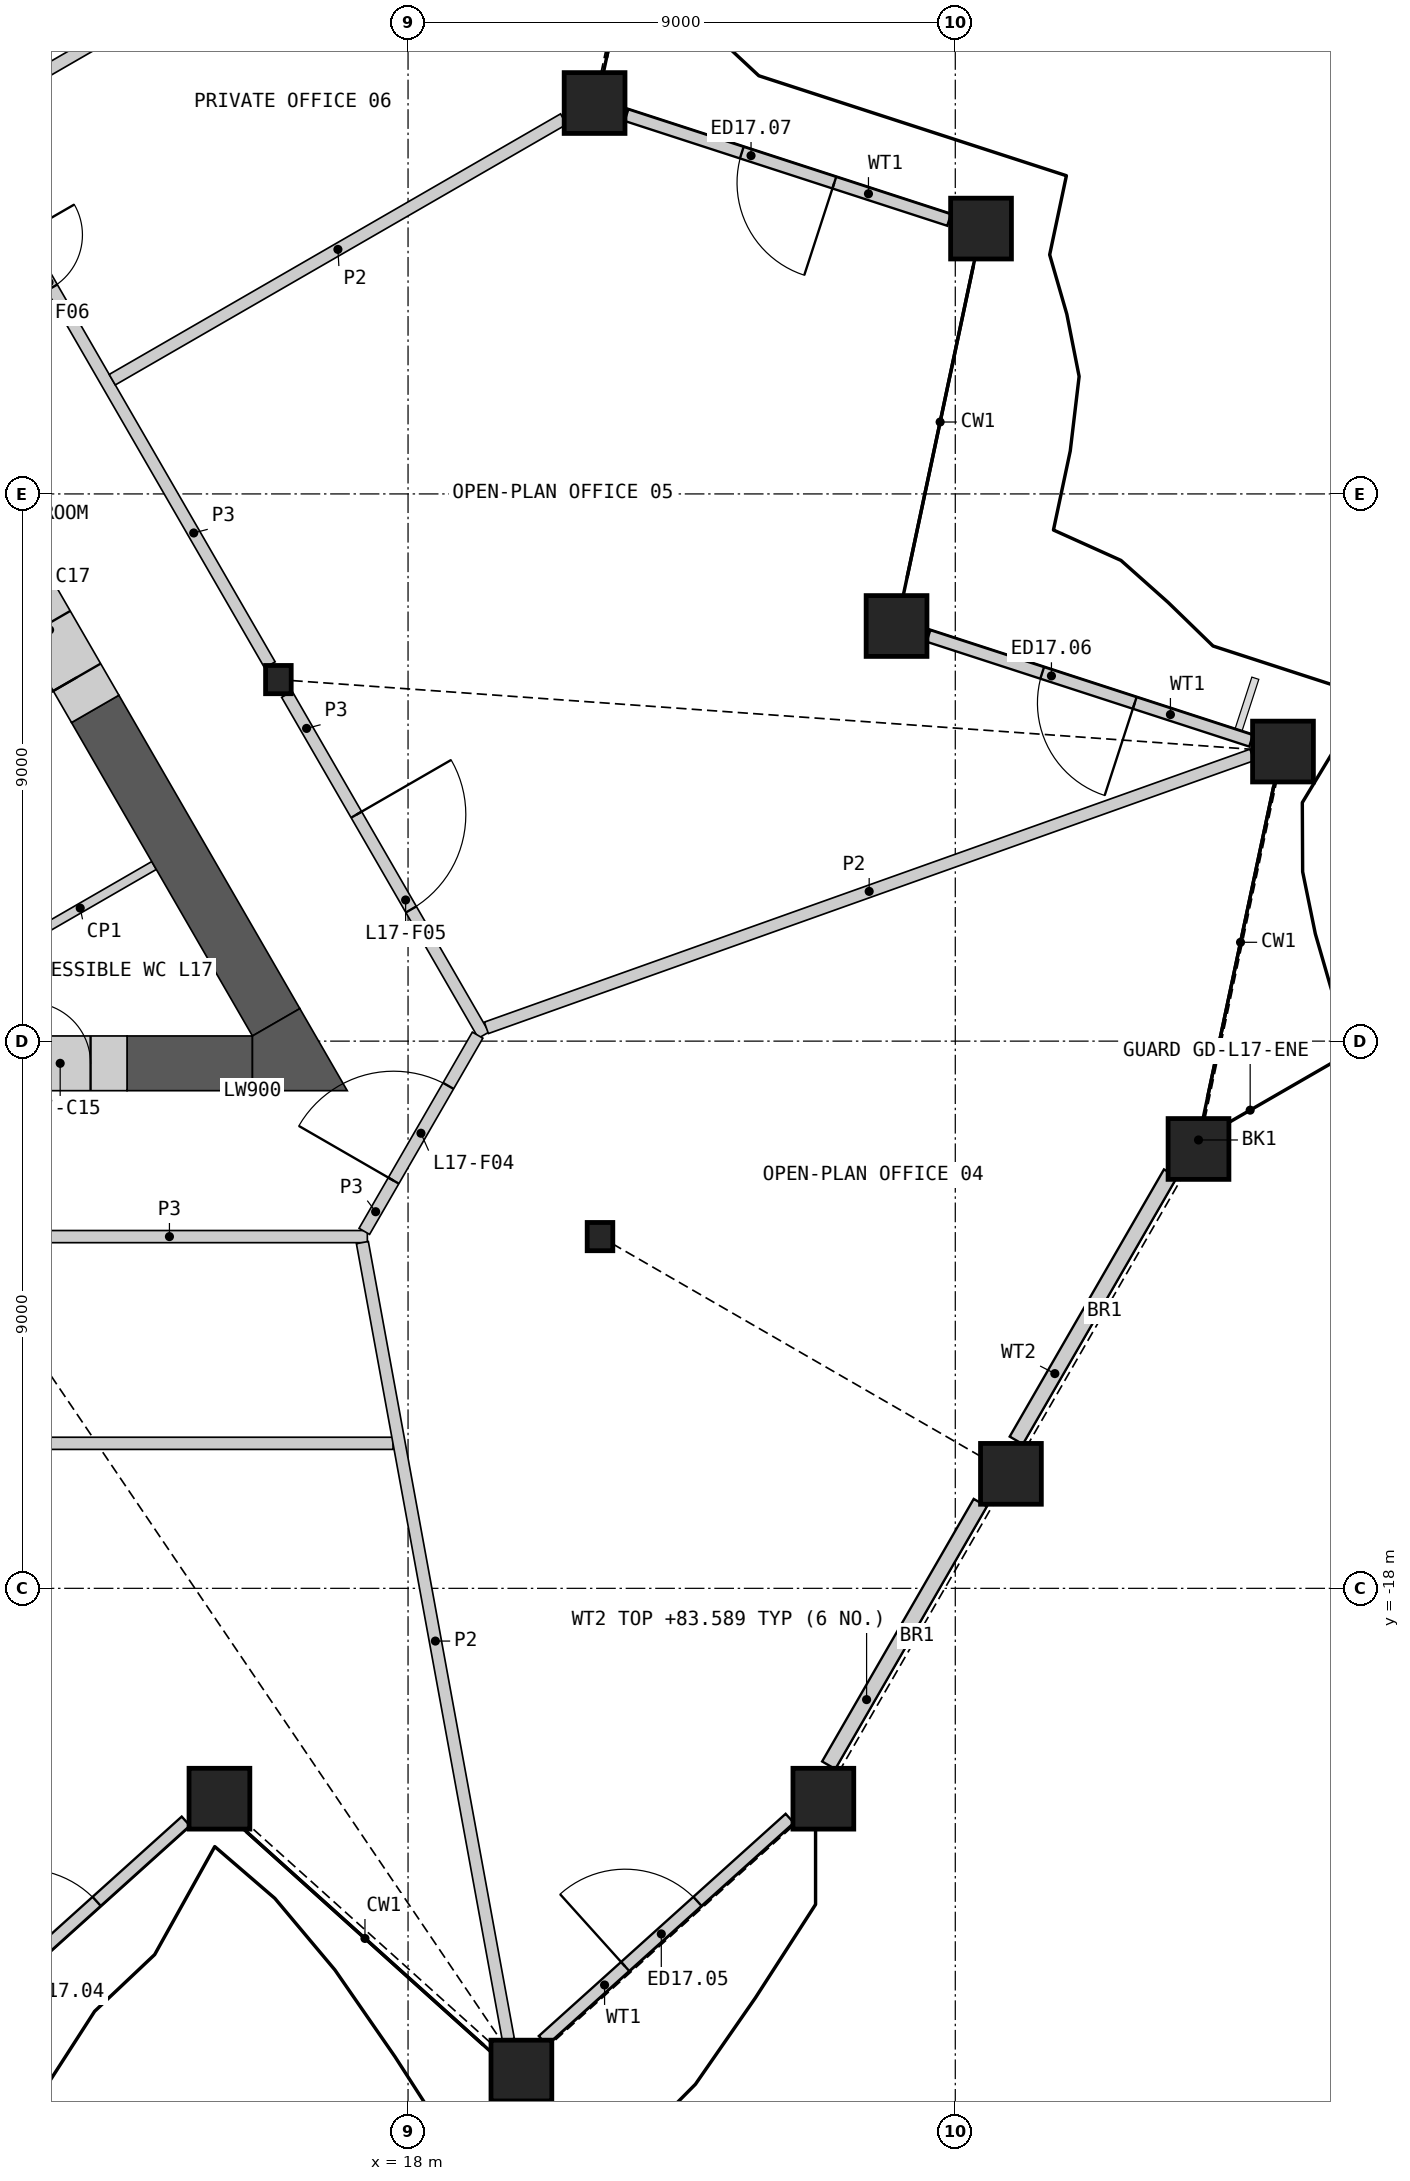
"""IFC4 building model, lengths in metres.
Left out: names, types, materials, properties, quantities, classifications, styles, units other than length and angle.
Written with IfcOpenShell. Run it as: python <this file> out.ifc"""

import sys

from ifc_helpers import new_model, si_unit, direction, frame, frame_2d, origin, origin_2d, place, context, subcontext, project, spatial, polyline, rectangle, hollow_rectangle, i_section, outline, extrude, element, fill, save


model = new_model("IFC4")
c1 = context("Model", 3, precision=1e-05, world=origin(), true_north=direction((0.0, 1.0)))
c2 = subcontext(c1, "Body", "Model", "MODEL_VIEW")
j1 = project(units=[si_unit("LENGTHUNIT", "METRE"), si_unit("PLANEANGLEUNIT", "RADIAN")], contexts=[c1])
p1 = place(None, origin())
s1 = spatial("IfcSite", under=j1, at=p1, CompositionType="ELEMENT")
p2 = place(p1, origin())
s2 = spatial("IfcBuilding", under=s1, at=p2, CompositionType="ELEMENT")
p3 = place(p2, frame((0.0, 0.0, 80.4)))
s3 = spatial("IfcBuildingStorey", under=s2, at=p3, CompositionType="ELEMENT", Elevation=80.4)
for number, where, z_axis, x_axis in (
    (1, (14.898, -21.46, 0.0), (0.0, 0.0, 1.0), (1.0, 0.0, 0.0)),
    (2, (19.864, -25.931, 0.0), (0.0, 0.0, 1.0), (1.0, 0.0, 0.0)),
    (3, (24.83, -21.46, 0.0), (0.0, 0.0, 1.0), (1.0, 0.0, 0.0)),
    (4, (27.915, -16.117, 0.0), (0.0, 0.0, 1.0), (1.0, 0.0, 0.0)),
    (5, (31.0, -10.774, 0.0), (0.0, 0.0, 1.0), (1.0, 0.0, 0.0)),
    (6, (32.389, -4.237, 0.0), (0.0, 0.0, 1.0), (1.0, 0.0, 0.0)),
    (7, (26.034, -2.172, 0.0), (0.0, 0.0, 1.0), (1.0, 0.0, 0.0)),
    (8, (27.423, 4.364, 0.0), (0.0, 0.0, 1.0), (1.0, 0.0, 0.0)),
    (9, (21.068, 6.429, 0.0), (0.0, 0.0, 1.0), (1.0, 0.0, 0.0)),
):
    element("IfcColumn", number, at=place(p3, frame(where, z_axis=z_axis, x_axis=x_axis)), inside=s3, PredefinedType="COLUMN", context=c2, shape_type="SweptSolid", body=[
        extrude(hollow_rectangle(XDim=1.0, YDim=1.0, WallThickness=0.07, at=origin_2d()), origin(), (0.0, 0.0, 1.0), 4.2),
    ])
for number, where, z_axis, x_axis in (
    (10, (21.157, -12.215, 0.0), (0.0, 0.0, 1.0), (1.0, 0.0, 0.0)),
    (11, (15.868, -3.054, 0.0), (0.0, 0.0, 1.0), (1.0, 0.0, 0.0)),
):
    element("IfcColumn", number, at=place(p3, frame(where, z_axis=z_axis, x_axis=x_axis)), inside=s3, PredefinedType="COLUMN", context=c2, shape_type="SweptSolid", body=[
        extrude(i_section(OverallWidth=0.421, OverallDepth=0.465, WebThickness=0.045, FlangeThickness=0.072, at=origin_2d()), origin(), (0.0, 0.0, 1.0), 4.2),
    ])
p4 = place(p3, frame((10.336, -25.438, 0.0), z_axis=(0.0, 0.0, 1.0), x_axis=(0.74316358834, 0.669109767501, 0.0)))
e12 = element("IfcWall", 12, at=p4, inside=s3, PredefinedType="SOLIDWALL", context=c2, shape_type="SweptSolid", body=[
    extrude(rectangle(XDim=5.394, YDim=0.2, at=frame_2d((2.697, 0.0))), origin(), (0.0, 0.0, 1.0), 3.189),
])
p5 = place(p4, frame((1.821, 0.0, 0.0)))
e13 = element("IfcOpeningElement", 13, at=p5, cuts=e12, PredefinedType="OPENING", context=c2, shape_type="SweptSolid", body=[
    extrude(rectangle(XDim=1.6, YDim=2.4, at=frame_2d((0.8, 1.2))), frame((0.0, 0.11, 0.0), z_axis=(0.0, -1.0, 0.0), x_axis=(1.0, 0.0, 0.0)), (0.0, 0.0, 1.0), 0.22),
])
p6 = place(p3, frame((20.217, -25.438, 0.0), z_axis=(0.0, 0.0, 1.0), x_axis=(0.743143013099, 0.669132619204, 0.0)))
e14 = element("IfcWall", 14, at=p6, inside=s3, PredefinedType="SOLIDWALL", context=c2, shape_type="SweptSolid", body=[
    extrude(rectangle(XDim=5.463, YDim=0.2, at=frame_2d((2.731, 0.0))), origin(), (0.0, 0.0, 1.0), 3.189),
])
p7 = place(p6, frame((1.821, 0.0, 0.0)))
e15 = element("IfcOpeningElement", 15, at=p7, cuts=e14, PredefinedType="OPENING", context=c2, shape_type="SweptSolid", body=[
    extrude(rectangle(XDim=1.6, YDim=2.4, at=frame_2d((0.8, 1.2))), frame((0.0, 0.11, 0.0), z_axis=(0.0, -1.0, 0.0), x_axis=(1.0, 0.0, 0.0)), (0.0, 0.0, 1.0), 0.22),
])
p8 = place(p3, frame((24.918, -20.91, 0.0), z_axis=(0.0, 0.0, 1.0), x_axis=(0.499978178329, 0.866038002165, 0.0)))
e16 = element("IfcWall", 16, at=p8, inside=s3, PredefinedType="SOLIDWALL", context=c2, shape_type="SweptSolid", body=[
    extrude(rectangle(XDim=4.986, YDim=0.25, at=frame_2d((2.493, 0.0))), origin(), (0.0, 0.0, 1.0), 3.189),
])
p9 = place(p3, frame((28.003, -15.567, 0.0), z_axis=(0.0, 0.0, 1.0), x_axis=(0.500004250643, 0.866022949661, 0.0)))
e17 = element("IfcWall", 17, at=p9, inside=s3, PredefinedType="SOLIDWALL", context=c2, shape_type="SweptSolid", body=[
    extrude(rectangle(XDim=5.075, YDim=0.25, at=frame_2d((2.537, 0.0))), origin(), (0.0, 0.0, 1.0), 3.189),
])
p10 = place(p3, frame((31.865, -4.06, 0.0), z_axis=(0.0, 0.0, 1.0), x_axis=(-0.951054004345, 0.309024725255, 0.0)))
e18 = element("IfcWall", 18, at=p10, inside=s3, PredefinedType="SOLIDWALL", context=c2, shape_type="SweptSolid", body=[
    extrude(rectangle(XDim=5.579, YDim=0.2, at=frame_2d((2.79, 0.0))), origin(), (0.0, 0.0, 1.0), 3.189),
])
p11 = place(p10, frame((2.012, 0.0, 0.0)))
e19 = element("IfcOpeningElement", 19, at=p11, cuts=e18, PredefinedType="OPENING", context=c2, shape_type="SweptSolid", body=[
    extrude(rectangle(XDim=1.6, YDim=2.4, at=frame_2d((0.8, 1.2))), frame((0.0, 0.11, 0.0), z_axis=(0.0, -1.0, 0.0), x_axis=(1.0, 0.0, 0.0)), (0.0, 0.0, 1.0), 0.22),
])
p12 = place(p3, frame((26.899, 4.505, 0.0), z_axis=(0.0, 0.0, 1.0), x_axis=(-0.951054004345, 0.309024725255, 0.0)))
e20 = element("IfcWall", 20, at=p12, inside=s3, PredefinedType="SOLIDWALL", context=c2, shape_type="SweptSolid", body=[
    extrude(rectangle(XDim=5.579, YDim=0.2, at=frame_2d((2.79, 0.0))), origin(), (0.0, 0.0, 1.0), 3.189),
])
p13 = place(p12, frame((1.985, 0.0, 0.0)))
e21 = element("IfcOpeningElement", 21, at=p13, cuts=e20, PredefinedType="OPENING", context=c2, shape_type="SweptSolid", body=[
    extrude(rectangle(XDim=1.6, YDim=2.4, at=frame_2d((0.8, 1.2))), frame((0.0, 0.11, 0.0), z_axis=(0.0, -1.0, 0.0), x_axis=(1.0, 0.0, 0.0)), (0.0, 0.0, 1.0), 0.22),
])
p14 = place(p3, frame((13.823, -6.111, 0.0), z_axis=(0.0, 0.0, 1.0), x_axis=(-0.866026802741, -0.499997576928, 0.0)))
e22 = element("IfcWall", 22, at=p14, inside=s3, PredefinedType="PARTITIONING", context=c2, shape_type="SweptSolid", body=[
    extrude(rectangle(XDim=5.607, YDim=0.15, at=frame_2d((2.804, 0.0))), origin(), (0.0, 0.0, 1.0), 3.8),
])
p15 = place(p3, frame((13.379, -9.365, 0.0), z_axis=(0.0, 0.0, 1.0), x_axis=(1.0, 0.0, 0.0)))
e23 = element("IfcWall", 23, at=p15, inside=s3, PredefinedType="SHEAR", context=c2, shape_type="SweptSolid", body=[
    extrude(rectangle(XDim=2.062, YDim=0.9, at=frame_2d((1.031, 0.0))), origin(), (0.0, 0.0, 1.0), 3.8),
])
p16 = place(p3, frame((15.831, -8.69, 0.0), z_axis=(0.0, 0.0, 1.0), x_axis=(-0.499999419053, 0.866025739194, 0.0)))
e24 = element("IfcWall", 24, at=p16, inside=s3, PredefinedType="SHEAR", context=c2, shape_type="SweptSolid", body=[
    extrude(rectangle(XDim=5.952, YDim=0.9, at=frame_2d((2.976, 0.0))), origin(), (0.0, 0.0, 1.0), 3.8),
])
p17 = place(p3, origin())
e25 = element("IfcWall", 25, at=p17, inside=s3, PredefinedType="SHEAR", context=c2, shape_type="SweptSolid", body=[
    extrude(outline(polyline([(15.441, -9.815), (15.441, -8.915), (16.221, -8.465), (17.0, -9.815), (15.441, -9.815)])), origin(), (0.0, 0.0, 1.0), 3.8),
])
p18 = place(p3, frame((11.179, -9.365, 0.0), z_axis=(0.0, 0.0, 1.0), x_axis=(1.0, 0.0, 0.0)))
e26 = element("IfcWall", 26, at=p18, inside=s3, PredefinedType="SHEAR", context=c2, shape_type="SweptSolid", body=[
    extrude(rectangle(XDim=2.2, YDim=0.9, at=frame_2d((1.1, 0.0))), origin(), (0.0, 0.0, 1.0), 3.8),
])
p19 = place(p18, frame((0.6, 0.0, 0.0)))
e27 = element("IfcOpeningElement", 27, at=p19, cuts=e26, PredefinedType="OPENING", context=c2, shape_type="SweptSolid", body=[
    extrude(rectangle(XDim=1.0, YDim=2.1, at=frame_2d((0.5, 1.05))), frame((0.0, 0.46, 0.0), z_axis=(0.0, -1.0, 0.0), x_axis=(1.0, 0.0, 0.0)), (0.0, 0.0, 1.0), 0.92),
])
p20 = place(p3, frame((12.855, -3.536, 0.0), z_axis=(0.0, 0.0, 1.0), x_axis=(-0.50002983664, 0.866008176907, 0.0)))
e28 = element("IfcWall", 28, at=p20, inside=s3, PredefinedType="SHEAR", context=c2, shape_type="SweptSolid", body=[
    extrude(rectangle(XDim=2.2, YDim=0.9, at=frame_2d((1.1, 0.0))), origin(), (0.0, 0.0, 1.0), 3.8),
])
p21 = place(p20, frame((0.6, 0.0, 0.0)))
e29 = element("IfcOpeningElement", 29, at=p21, cuts=e28, PredefinedType="OPENING", context=c2, shape_type="SweptSolid", body=[
    extrude(rectangle(XDim=1.0, YDim=2.1, at=frame_2d((0.5, 1.05))), frame((0.0, 0.46, 0.0), z_axis=(0.0, -1.0, 0.0), x_axis=(1.0, 0.0, 0.0)), (0.0, 0.0, 1.0), 0.92),
])
p22 = place(p3, frame((10.719, 5.865, 0.0), z_axis=(0.0, 0.0, 1.0), x_axis=(0.49999175339, -0.866030164915, 0.0)))
e30 = element("IfcWall", 30, at=p22, inside=s3, PredefinedType="PARTITIONING", context=c2, shape_type="SweptSolid", body=[
    extrude(rectangle(XDim=10.019, YDim=0.2, at=frame_2d((5.009, 0.0))), origin(), (0.0, 0.0, 1.0), 3.8),
])
p23 = place(p22, frame((1.854, 0.0, 0.0)))
e31 = element("IfcOpeningElement", 31, at=p23, cuts=e30, PredefinedType="OPENING", context=c2, shape_type="SweptSolid", body=[
    extrude(rectangle(XDim=1.0, YDim=2.1, at=frame_2d((0.5, 1.05))), frame((0.0, 0.11, 0.0), z_axis=(0.0, -1.0, 0.0), x_axis=(1.0, 0.0, 0.0)), (0.0, 0.0, 1.0), 0.22),
])
p24 = place(p3, frame((10.821, -12.215, 0.0), z_axis=(0.0, 0.0, 1.0), x_axis=(1.0, 0.0, 0.0)))
e32 = element("IfcWall", 32, at=p24, inside=s3, PredefinedType="PARTITIONING", context=c2, shape_type="SweptSolid", body=[
    extrude(rectangle(XDim=6.51, YDim=0.2, at=frame_2d((3.255, 0.0))), origin(), (0.0, 0.0, 1.0), 3.8),
])
p25 = place(p3, frame((16.008, -3.296, 0.0), z_axis=(0.0, 0.0, 1.0), x_axis=(0.499984737558, -0.86603421538, 0.0)))
e33 = element("IfcWall", 33, at=p25, inside=s3, PredefinedType="PARTITIONING", context=c2, shape_type="SweptSolid", body=[
    extrude(rectangle(XDim=6.473, YDim=0.2, at=frame_2d((3.236, 0.0))), origin(), (0.0, 0.0, 1.0), 3.8),
])
p26 = place(p25, frame((2.285, 0.0, 0.0)))
e34 = element("IfcOpeningElement", 34, at=p26, cuts=e33, PredefinedType="OPENING", context=c2, shape_type="SweptSolid", body=[
    extrude(rectangle(XDim=1.8, YDim=2.1, at=frame_2d((0.9, 1.05))), frame((0.0, 0.11, 0.0), z_axis=(0.0, -1.0, 0.0), x_axis=(1.0, 0.0, 0.0)), (0.0, 0.0, 1.0), 0.22),
])
p27 = place(p3, frame((17.281, -12.128, 0.0), z_axis=(0.0, 0.0, 1.0), x_axis=(0.499958791762, 0.866049194065, 0.0)))
e35 = element("IfcWall", 35, at=p27, inside=s3, PredefinedType="PARTITIONING", context=c2, shape_type="SweptSolid", body=[
    extrude(rectangle(XDim=3.726, YDim=0.2, at=frame_2d((1.863, 0.0))), origin(), (0.0, 0.0, 1.0), 3.8),
])
p28 = place(p27, frame((0.963, 0.0, 0.0)))
e36 = element("IfcOpeningElement", 36, at=p28, cuts=e35, PredefinedType="OPENING", context=c2, shape_type="SweptSolid", body=[
    extrude(rectangle(XDim=1.8, YDim=2.1, at=frame_2d((0.9, 1.05))), frame((0.0, 0.11, 0.0), z_axis=(0.0, -1.0, 0.0), x_axis=(1.0, 0.0, 0.0)), (0.0, 0.0, 1.0), 0.22),
])
p29 = place(p3, frame((0.1, -15.615, 0.0), z_axis=(0.0, 0.0, 1.0), x_axis=(1.0, 0.0, 0.0)))
e37 = element("IfcWall", 37, at=p29, inside=s3, PredefinedType="PARTITIONING", context=c2, shape_type="SweptSolid", body=[
    extrude(rectangle(XDim=17.654, YDim=0.2, at=frame_2d((8.827, 0.0))), origin(), (0.0, 0.0, 1.0), 2.885),
])
p30 = place(p29, frame((8.652, 0.0, 0.0)))
e38 = element("IfcOpeningElement", 38, at=p30, cuts=e37, PredefinedType="OPENING", context=c2, shape_type="SweptSolid", body=[
    extrude(rectangle(XDim=0.95, YDim=2.1, at=frame_2d((0.475, 1.05))), frame((0.0, 0.11, 0.0), z_axis=(0.0, -1.0, 0.0), x_axis=(1.0, 0.0, 0.0)), (0.0, 0.0, 1.0), 0.22),
])
p31 = place(p3, frame((19.288, -8.781, 0.0), z_axis=(0.0, 0.0, 1.0), x_axis=(0.94194008836, 0.33578098508, 0.0)))
e39 = element("IfcWall", 39, at=p31, inside=s3, PredefinedType="PARTITIONING", context=c2, shape_type="SweptSolid", body=[
    extrude(rectangle(XDim=13.367, YDim=0.2, at=frame_2d((6.684, 0.0))), origin(), (0.0, 0.0, 1.0), 2.885),
])
p32 = place(p3, frame((17.249, -12.313, 0.0), z_axis=(0.0, 0.0, 1.0), x_axis=(0.180179866985, -0.983633679544, 0.0)))
e40 = element("IfcWall", 40, at=p32, inside=s3, PredefinedType="PARTITIONING", context=c2, shape_type="SweptSolid", body=[
    extrude(rectangle(XDim=13.326, YDim=0.2, at=frame_2d((6.663, 0.0))), origin(), (0.0, 0.0, 1.0), 2.885),
])
p33 = place(p3, frame((10.821, 6.247, 0.0), z_axis=(0.0, 0.0, 1.0), x_axis=(0.866026729935, 0.499997703033, 0.0)))
e41 = element("IfcWall", 41, at=p33, inside=s3, PredefinedType="PARTITIONING", context=c2, shape_type="SweptSolid", body=[
    extrude(rectangle(XDim=12.848, YDim=0.2, at=frame_2d((6.424, 0.0))), origin(), (0.0, 0.0, 1.0), 2.885),
])
p34 = place(p3, frame((13.135, 1.879, 0.0), z_axis=(0.0, 0.0, 1.0), x_axis=(0.866027626846, 0.499996149525, 0.0)))
e42 = element("IfcWall", 42, at=p34, inside=s3, PredefinedType="PARTITIONING", context=c2, shape_type="SweptSolid", body=[
    extrude(rectangle(XDim=8.571, YDim=0.2, at=frame_2d((4.285, 0.0))), origin(), (0.0, 0.0, 1.0), 2.885),
])
p35 = place(p5, origin())
e43 = element("IfcDoor", 43, at=p35, inside=s3, OperationType="DOUBLE_DOOR_SINGLE_SWING", PredefinedType="DOOR", context=c2, shape_type="SweptSolid", body=[
    extrude(rectangle(XDim=1.6, YDim=2.4, at=frame_2d((0.8, 1.2))), frame((0.0, 0.025, 0.0), z_axis=(0.0, -1.0, 0.0), x_axis=(1.0, 0.0, 0.0)), (0.0, 0.0, 1.0), 0.05),
])
fill(e13, e43)
p36 = place(p7, origin())
e44 = element("IfcDoor", 44, at=p36, inside=s3, OperationType="DOUBLE_DOOR_SINGLE_SWING", PredefinedType="DOOR", context=c2, shape_type="SweptSolid", body=[
    extrude(rectangle(XDim=1.6, YDim=2.4, at=frame_2d((0.8, 1.2))), frame((0.0, 0.025, 0.0), z_axis=(0.0, -1.0, 0.0), x_axis=(1.0, 0.0, 0.0)), (0.0, 0.0, 1.0), 0.05),
])
fill(e15, e44)
p37 = place(p11, origin())
e45 = element("IfcDoor", 45, at=p37, inside=s3, OperationType="DOUBLE_DOOR_SINGLE_SWING", PredefinedType="DOOR", context=c2, shape_type="SweptSolid", body=[
    extrude(rectangle(XDim=1.6, YDim=2.4, at=frame_2d((0.8, 1.2))), frame((0.0, 0.025, 0.0), z_axis=(0.0, -1.0, 0.0), x_axis=(1.0, 0.0, 0.0)), (0.0, 0.0, 1.0), 0.05),
])
fill(e19, e45)
p38 = place(p13, origin())
e46 = element("IfcDoor", 46, at=p38, inside=s3, OperationType="DOUBLE_DOOR_SINGLE_SWING", PredefinedType="DOOR", context=c2, shape_type="SweptSolid", body=[
    extrude(rectangle(XDim=1.6, YDim=2.4, at=frame_2d((0.8, 1.2))), frame((0.0, 0.025, 0.0), z_axis=(0.0, -1.0, 0.0), x_axis=(1.0, 0.0, 0.0)), (0.0, 0.0, 1.0), 0.05),
])
fill(e21, e46)
p39 = place(p19, origin())
e47 = element("IfcDoor", 47, at=p39, inside=s3, OperationType="SINGLE_SWING_LEFT", PredefinedType="DOOR", context=c2, shape_type="SweptSolid", body=[
    extrude(rectangle(XDim=1.0, YDim=2.1, at=frame_2d((0.5, 1.05))), frame((0.0, 0.205, 0.0), z_axis=(0.0, -1.0, 0.0), x_axis=(1.0, 0.0, 0.0)), (0.0, 0.0, 1.0), 0.05),
])
fill(e27, e47)
p40 = place(p21, origin())
e48 = element("IfcDoor", 48, at=p40, inside=s3, OperationType="SINGLE_SWING_LEFT", PredefinedType="DOOR", context=c2, shape_type="SweptSolid", body=[
    extrude(rectangle(XDim=1.0, YDim=2.1, at=frame_2d((0.5, 1.05))), frame((0.0, 0.205, 0.0), z_axis=(0.0, -1.0, 0.0), x_axis=(1.0, 0.0, 0.0)), (0.0, 0.0, 1.0), 0.05),
])
fill(e29, e48)
p41 = place(p28, origin())
e49 = element("IfcDoor", 49, at=p41, inside=s3, OperationType="DOUBLE_DOOR_SINGLE_SWING", PredefinedType="DOOR", context=c2, shape_type="SweptSolid", body=[
    extrude(rectangle(XDim=1.8, YDim=2.1, at=frame_2d((0.9, 1.05))), frame((0.0, 0.025, 0.0), z_axis=(0.0, -1.0, 0.0), x_axis=(1.0, 0.0, 0.0)), (0.0, 0.0, 1.0), 0.05),
])
fill(e36, e49)
p42 = place(p26, origin())
e50 = element("IfcDoor", 50, at=p42, inside=s3, OperationType="DOUBLE_DOOR_SINGLE_SWING", PredefinedType="DOOR", context=c2, shape_type="SweptSolid", body=[
    extrude(rectangle(XDim=1.8, YDim=2.1, at=frame_2d((0.9, 1.05))), frame((0.0, 0.025, 0.0), z_axis=(0.0, -1.0, 0.0), x_axis=(1.0, 0.0, 0.0)), (0.0, 0.0, 1.0), 0.05),
])
fill(e34, e50)
p43 = place(p23, origin())
e51 = element("IfcDoor", 51, at=p43, inside=s3, OperationType="SINGLE_SWING_LEFT", PredefinedType="DOOR", context=c2, shape_type="SweptSolid", body=[
    extrude(rectangle(XDim=1.0, YDim=2.1, at=frame_2d((0.5, 1.05))), frame((0.0, 0.025, 0.0), z_axis=(0.0, -1.0, 0.0), x_axis=(1.0, 0.0, 0.0)), (0.0, 0.0, 1.0), 0.05),
])
fill(e31, e51)
save(model, sys.argv[1])
